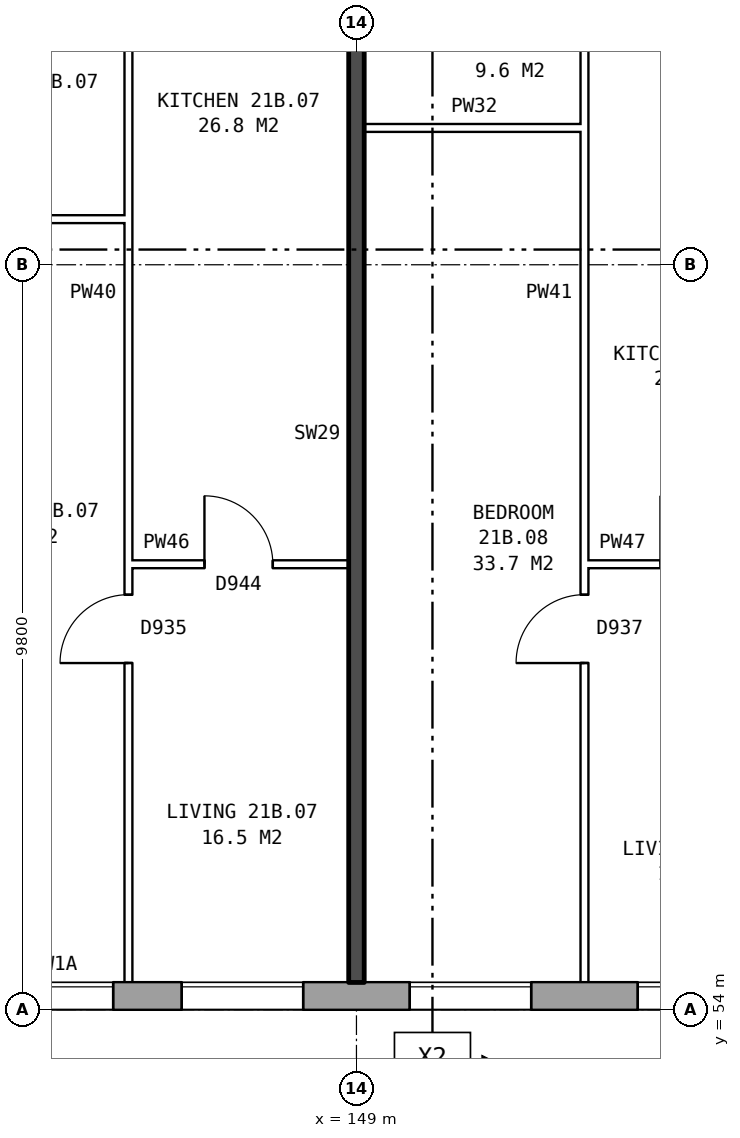
"""IFC4 building model, lengths in metres.
Left out: names, types, materials, properties, quantities, classifications, styles, units other than length and angle.
Written with IfcOpenShell. Run it as: python <this file> out.ifc"""

import sys

from ifc_helpers import new_model, si_unit, direction, frame, frame_2d, origin, place, context, subcontext, project, spatial, rectangle, extrude, element, fill, save


model = new_model("IFC4")
c1 = context("Model", 3, precision=1e-05, world=origin(), true_north=direction((0.0, 1.0)))
c2 = subcontext(c1, "Body", "Model", "MODEL_VIEW")
j1 = project(units=[si_unit("LENGTHUNIT", "METRE"), si_unit("PLANEANGLEUNIT", "RADIAN")], contexts=[c1])
p1 = place(None, origin())
s1 = spatial("IfcSite", under=j1, at=p1, CompositionType="ELEMENT")
p2 = place(p1, origin())
s2 = spatial("IfcBuilding", under=s1, at=p2, CompositionType="ELEMENT")
p3 = place(p2, frame((0.0, 0.0, 77.8)))
s3 = spatial("IfcBuildingStorey", under=s2, at=p3, CompositionType="ELEMENT", Elevation=77.8)
p4 = place(p3, frame((134.075, 54.18, 0.0), z_axis=(0.0, 0.0, 1.0), x_axis=(1.0, 0.0, 0.0)))
e1 = element("IfcWall", 1, at=p4, inside=s3, PredefinedType="STANDARD", context=c2, shape_type="SweptSolid", body=[
    extrude(rectangle(XDim=38.101, YDim=0.36, at=frame_2d((19.05, 0.0))), origin(), (0.0, 0.0, 1.0), 2.85),
])
p5 = place(p4, frame((0.625, 0.0, 0.8)))
e2 = element("IfcOpeningElement", 2, at=p5, cuts=e1, PredefinedType="OPENING", context=c2, shape_type="SweptSolid", body=[
    extrude(rectangle(XDim=1.6, YDim=1.8, at=frame_2d((0.8, 0.9))), frame((0.0, 0.19, 0.0), z_axis=(0.0, -1.0, 0.0), x_axis=(1.0, 0.0, 0.0)), (0.0, 0.0, 1.0), 0.38),
])
p6 = place(p4, frame((3.625, 0.0, 0.8)))
e3 = element("IfcOpeningElement", 3, at=p6, cuts=e1, PredefinedType="OPENING", context=c2, shape_type="SweptSolid", body=[
    extrude(rectangle(XDim=1.6, YDim=1.8, at=frame_2d((0.8, 0.9))), frame((0.0, 0.19, 0.0), z_axis=(0.0, -1.0, 0.0), x_axis=(1.0, 0.0, 0.0)), (0.0, 0.0, 1.0), 0.38),
])
p7 = place(p4, frame((5.525, 0.0, 0.8)))
e4 = element("IfcOpeningElement", 4, at=p7, cuts=e1, PredefinedType="OPENING", context=c2, shape_type="SweptSolid", body=[
    extrude(rectangle(XDim=1.6, YDim=1.8, at=frame_2d((0.8, 0.9))), frame((0.0, 0.19, 0.0), z_axis=(0.0, -1.0, 0.0), x_axis=(1.0, 0.0, 0.0)), (0.0, 0.0, 1.0), 0.38),
])
p8 = place(p4, frame((9.425, 0.0, 0.65)))
e5 = element("IfcOpeningElement", 5, at=p8, cuts=e1, PredefinedType="OPENING", context=c2, shape_type="SweptSolid", body=[
    extrude(rectangle(XDim=0.6, YDim=0.9, at=frame_2d((0.3, 0.45))), frame((0.0, 0.19, 0.0), z_axis=(0.0, -1.0, 0.0), x_axis=(1.0, 0.0, 0.0)), (0.0, 0.0, 1.0), 0.38),
])
p9 = place(p4, frame((12.625, 0.0, 0.8)))
e6 = element("IfcOpeningElement", 6, at=p9, cuts=e1, PredefinedType="OPENING", context=c2, shape_type="SweptSolid", body=[
    extrude(rectangle(XDim=1.6, YDim=1.8, at=frame_2d((0.8, 0.9))), frame((0.0, 0.19, 0.0), z_axis=(0.0, -1.0, 0.0), x_axis=(1.0, 0.0, 0.0)), (0.0, 0.0, 1.0), 0.38),
])
p10 = place(p4, frame((15.625, 0.0, 0.8)))
e7 = element("IfcOpeningElement", 7, at=p10, cuts=e1, PredefinedType="OPENING", context=c2, shape_type="SweptSolid", body=[
    extrude(rectangle(XDim=1.6, YDim=1.8, at=frame_2d((0.8, 0.9))), frame((0.0, 0.19, 0.0), z_axis=(0.0, -1.0, 0.0), x_axis=(1.0, 0.0, 0.0)), (0.0, 0.0, 1.0), 0.38),
])
p11 = place(p4, frame((18.625, 0.0, 0.8)))
e8 = element("IfcOpeningElement", 8, at=p11, cuts=e1, PredefinedType="OPENING", context=c2, shape_type="SweptSolid", body=[
    extrude(rectangle(XDim=1.6, YDim=1.8, at=frame_2d((0.8, 0.9))), frame((0.0, 0.19, 0.0), z_axis=(0.0, -1.0, 0.0), x_axis=(1.0, 0.0, 0.0)), (0.0, 0.0, 1.0), 0.38),
])
p12 = place(p4, frame((21.625, 0.0, 0.8)))
e9 = element("IfcOpeningElement", 9, at=p12, cuts=e1, PredefinedType="OPENING", context=c2, shape_type="SweptSolid", body=[
    extrude(rectangle(XDim=1.6, YDim=1.8, at=frame_2d((0.8, 0.9))), frame((0.0, 0.19, 0.0), z_axis=(0.0, -1.0, 0.0), x_axis=(1.0, 0.0, 0.0)), (0.0, 0.0, 1.0), 0.38),
])
p13 = place(p4, frame((24.625, 0.0, 0.8)))
e10 = element("IfcOpeningElement", 10, at=p13, cuts=e1, PredefinedType="OPENING", context=c2, shape_type="SweptSolid", body=[
    extrude(rectangle(XDim=1.6, YDim=1.8, at=frame_2d((0.8, 0.9))), frame((0.0, 0.19, 0.0), z_axis=(0.0, -1.0, 0.0), x_axis=(1.0, 0.0, 0.0)), (0.0, 0.0, 1.0), 0.38),
])
p14 = place(p4, frame((27.125, 0.0, 0.8)))
e11 = element("IfcOpeningElement", 11, at=p14, cuts=e1, PredefinedType="OPENING", context=c2, shape_type="SweptSolid", body=[
    extrude(rectangle(XDim=1.4, YDim=0.9, at=frame_2d((0.7, 0.45))), frame((0.0, 0.19, 0.0), z_axis=(0.0, -1.0, 0.0), x_axis=(1.0, 0.0, 0.0)), (0.0, 0.0, 1.0), 0.38),
])
p15 = place(p4, frame((30.625, 0.0, 0.8)))
e12 = element("IfcOpeningElement", 12, at=p15, cuts=e1, PredefinedType="OPENING", context=c2, shape_type="SweptSolid", body=[
    extrude(rectangle(XDim=1.6, YDim=1.8, at=frame_2d((0.8, 0.9))), frame((0.0, 0.19, 0.0), z_axis=(0.0, -1.0, 0.0), x_axis=(1.0, 0.0, 0.0)), (0.0, 0.0, 1.0), 0.38),
])
p16 = place(p4, frame((33.625, 0.0, 0.8)))
e13 = element("IfcOpeningElement", 13, at=p16, cuts=e1, PredefinedType="OPENING", context=c2, shape_type="SweptSolid", body=[
    extrude(rectangle(XDim=1.6, YDim=1.8, at=frame_2d((0.8, 0.9))), frame((0.0, 0.19, 0.0), z_axis=(0.0, -1.0, 0.0), x_axis=(1.0, 0.0, 0.0)), (0.0, 0.0, 1.0), 0.38),
])
p17 = place(p4, frame((7.425, 0.0, 1.3)))
e14 = element("IfcOpeningElement", 14, at=p17, cuts=e1, PredefinedType="OPENING", context=c2, shape_type="SweptSolid", body=[
    extrude(rectangle(XDim=0.6, YDim=1.2, at=frame_2d((0.3, 0.6))), frame((0.0, 0.19, 0.0), z_axis=(0.0, -1.0, 0.0), x_axis=(1.0, 0.0, 0.0)), (0.0, 0.0, 1.0), 0.38),
])
p18 = place(p4, frame((10.325, 0.0, 0.65)))
e15 = element("IfcOpeningElement", 15, at=p18, cuts=e1, PredefinedType="OPENING", context=c2, shape_type="SweptSolid", body=[
    extrude(rectangle(XDim=1.4, YDim=1.8, at=frame_2d((0.7, 0.9))), frame((0.0, 0.19, 0.0), z_axis=(0.0, -1.0, 0.0), x_axis=(1.0, 0.0, 0.0)), (0.0, 0.0, 1.0), 0.38),
])
p19 = place(p4, frame((29.675, 0.0, 1.7)))
e16 = element("IfcOpeningElement", 16, at=p19, cuts=e1, PredefinedType="OPENING", context=c2, shape_type="SweptSolid", body=[
    extrude(rectangle(XDim=0.6, YDim=0.9, at=frame_2d((0.3, 0.45))), frame((0.0, 0.19, 0.0), z_axis=(0.0, -1.0, 0.0), x_axis=(1.0, 0.0, 0.0)), (0.0, 0.0, 1.0), 0.38),
])
p20 = place(p3, frame((146.0, 59.86, 0.0), z_axis=(0.0, 0.0, 1.0), x_axis=(1.0, 0.0, 0.0)))
e17 = element("IfcWall", 17, at=p20, inside=s3, PredefinedType="PARTITIONING", context=c2, shape_type="SweptSolid", body=[
    extrude(rectangle(XDim=2.9, YDim=0.1, at=frame_2d((1.45, 0.0))), origin(), (0.0, 0.0, 1.0), 2.85),
])
p21 = place(p20, frame((1.0, 0.0, 0.0)))
e18 = element("IfcOpeningElement", 18, at=p21, cuts=e17, PredefinedType="OPENING", context=c2, shape_type="SweptSolid", body=[
    extrude(rectangle(XDim=0.9, YDim=2.1, at=frame_2d((0.45, 1.05))), frame((0.0, 0.06, 0.0), z_axis=(0.0, -1.0, 0.0), x_axis=(1.0, 0.0, 0.0)), (0.0, 0.0, 1.0), 0.12),
])
p22 = place(p3, frame((152.0, 59.86, 0.0), z_axis=(0.0, 0.0, 1.0), x_axis=(1.0, 0.0, 0.0)))
e19 = element("IfcWall", 19, at=p22, inside=s3, PredefinedType="PARTITIONING", context=c2, shape_type="SweptSolid", body=[
    extrude(rectangle(XDim=2.9, YDim=0.1, at=frame_2d((1.45, 0.0))), origin(), (0.0, 0.0, 1.0), 2.85),
])
p23 = place(p22, frame((1.0, 0.0, 0.0)))
e20 = element("IfcOpeningElement", 20, at=p23, cuts=e19, PredefinedType="OPENING", context=c2, shape_type="SweptSolid", body=[
    extrude(rectangle(XDim=0.9, YDim=2.1, at=frame_2d((0.45, 1.05))), frame((0.0, 0.06, 0.0), z_axis=(0.0, -1.0, 0.0), x_axis=(1.0, 0.0, 0.0)), (0.0, 0.0, 1.0), 0.12),
])
p24 = place(p3, frame((142.76, 64.4, 0.0), z_axis=(0.0, 0.0, 1.0), x_axis=(1.0, 0.0, 0.0)))
e21 = element("IfcWall", 21, at=p24, inside=s3, PredefinedType="PARTITIONING", context=c2, shape_type="SweptSolid", body=[
    extrude(rectangle(XDim=3.24, YDim=0.1, at=frame_2d((1.62, 0.0))), origin(), (0.0, 0.0, 1.0), 2.85),
])
p25 = place(p3, frame((149.1, 65.6, 0.0), z_axis=(0.0, 0.0, 1.0), x_axis=(1.0, 0.0, 0.0)))
e22 = element("IfcWall", 22, at=p25, inside=s3, PredefinedType="PARTITIONING", context=c2, shape_type="SweptSolid", body=[
    extrude(rectangle(XDim=2.9, YDim=0.1, at=frame_2d((1.45, 0.0))), origin(), (0.0, 0.0, 1.0), 2.85),
])
p26 = place(p3, frame((146.0, 54.36, 0.0), z_axis=(0.0, 0.0, 1.0), x_axis=(0.0, 1.0, 0.0)))
e23 = element("IfcWall", 23, at=p26, inside=s3, PredefinedType="PARTITIONING", context=c2, shape_type="SweptSolid", body=[
    extrude(rectangle(XDim=14.34, YDim=0.1, at=frame_2d((7.17, 0.0))), origin(), (0.0, 0.0, 1.0), 2.85),
])
p27 = place(p26, frame((4.2, 0.0, 0.0)))
e24 = element("IfcOpeningElement", 24, at=p27, cuts=e23, PredefinedType="OPENING", context=c2, shape_type="SweptSolid", body=[
    extrude(rectangle(XDim=0.9, YDim=2.1, at=frame_2d((0.45, 1.05))), frame((0.0, 0.06, 0.0), z_axis=(0.0, -1.0, 0.0), x_axis=(1.0, 0.0, 0.0)), (0.0, 0.0, 1.0), 0.12),
])
p28 = place(p26, frame((13.04, 0.0, 0.0)))
e25 = element("IfcOpeningElement", 25, at=p28, cuts=e23, PredefinedType="OPENING", context=c2, shape_type="SweptSolid", body=[
    extrude(rectangle(XDim=0.9, YDim=2.1, at=frame_2d((0.45, 1.05))), frame((0.0, 0.06, 0.0), z_axis=(0.0, -1.0, 0.0), x_axis=(1.0, 0.0, 0.0)), (0.0, 0.0, 1.0), 0.12),
])
p29 = place(p3, frame((149.0, 54.36, 0.0), z_axis=(0.0, 0.0, 1.0), x_axis=(0.0, 1.0, 0.0)))
e26 = element("IfcWall", 26, at=p29, inside=s3, PredefinedType="SOLIDWALL", context=c2, shape_type="SweptSolid", body=[
    extrude(rectangle(XDim=14.44, YDim=0.2, at=frame_2d((7.22, 0.0))), origin(), (0.0, 0.0, 1.0), 2.85),
])
p30 = place(p3, frame((152.0, 54.36, 0.0), z_axis=(0.0, 0.0, 1.0), x_axis=(0.0, 1.0, 0.0)))
e27 = element("IfcWall", 27, at=p30, inside=s3, PredefinedType="PARTITIONING", context=c2, shape_type="SweptSolid", body=[
    extrude(rectangle(XDim=14.34, YDim=0.1, at=frame_2d((7.17, 0.0))), origin(), (0.0, 0.0, 1.0), 2.85),
])
p31 = place(p30, frame((4.2, 0.0, 0.0)))
e28 = element("IfcOpeningElement", 28, at=p31, cuts=e27, PredefinedType="OPENING", context=c2, shape_type="SweptSolid", body=[
    extrude(rectangle(XDim=0.9, YDim=2.1, at=frame_2d((0.45, 1.05))), frame((0.0, 0.06, 0.0), z_axis=(0.0, -1.0, 0.0), x_axis=(1.0, 0.0, 0.0)), (0.0, 0.0, 1.0), 0.12),
])
p32 = place(p30, frame((13.04, 0.0, 0.0)))
e29 = element("IfcOpeningElement", 29, at=p32, cuts=e27, PredefinedType="OPENING", context=c2, shape_type="SweptSolid", body=[
    extrude(rectangle(XDim=0.9, YDim=2.1, at=frame_2d((0.45, 1.05))), frame((0.0, 0.06, 0.0), z_axis=(0.0, -1.0, 0.0), x_axis=(1.0, 0.0, 0.0)), (0.0, 0.0, 1.0), 0.12),
])
p33 = place(p9, origin())
e30 = element("IfcWindow", 30, at=p33, inside=s3, PartitioningType="SINGLE_PANEL", PredefinedType="WINDOW", context=c2, shape_type="SweptSolid", body=[
    extrude(rectangle(XDim=1.6, YDim=1.8, at=frame_2d((0.8, 0.9))), frame((0.0, 0.15, 0.0), z_axis=(0.0, -1.0, 0.0), x_axis=(1.0, 0.0, 0.0)), (0.0, 0.0, 1.0), 0.06),
])
fill(e6, e30)
p34 = place(p10, origin())
e31 = element("IfcWindow", 31, at=p34, inside=s3, PartitioningType="SINGLE_PANEL", PredefinedType="WINDOW", context=c2, shape_type="SweptSolid", body=[
    extrude(rectangle(XDim=1.6, YDim=1.8, at=frame_2d((0.8, 0.9))), frame((0.0, 0.15, 0.0), z_axis=(0.0, -1.0, 0.0), x_axis=(1.0, 0.0, 0.0)), (0.0, 0.0, 1.0), 0.06),
])
fill(e7, e31)
p35 = place(p11, origin())
e32 = element("IfcWindow", 32, at=p35, inside=s3, PartitioningType="SINGLE_PANEL", PredefinedType="WINDOW", context=c2, shape_type="SweptSolid", body=[
    extrude(rectangle(XDim=1.6, YDim=1.8, at=frame_2d((0.8, 0.9))), frame((0.0, 0.15, 0.0), z_axis=(0.0, -1.0, 0.0), x_axis=(1.0, 0.0, 0.0)), (0.0, 0.0, 1.0), 0.06),
])
fill(e8, e32)
p36 = place(p27, origin())
e33 = element("IfcDoor", 33, at=p36, inside=s3, OperationType="SINGLE_SWING_LEFT", PredefinedType="DOOR", context=c2, shape_type="SweptSolid", body=[
    extrude(rectangle(XDim=0.9, YDim=2.1, at=frame_2d((0.45, 1.05))), frame((0.0, 0.025, 0.0), z_axis=(0.0, -1.0, 0.0), x_axis=(1.0, 0.0, 0.0)), (0.0, 0.0, 1.0), 0.05),
])
fill(e24, e33)
p37 = place(p21, origin())
e34 = element("IfcDoor", 34, at=p37, inside=s3, OperationType="SINGLE_SWING_LEFT", PredefinedType="DOOR", context=c2, shape_type="SweptSolid", body=[
    extrude(rectangle(XDim=0.9, YDim=2.1, at=frame_2d((0.45, 1.05))), frame((0.0, 0.025, 0.0), z_axis=(0.0, -1.0, 0.0), x_axis=(1.0, 0.0, 0.0)), (0.0, 0.0, 1.0), 0.05),
])
fill(e18, e34)
p38 = place(p31, origin())
e35 = element("IfcDoor", 35, at=p38, inside=s3, OperationType="SINGLE_SWING_LEFT", PredefinedType="DOOR", context=c2, shape_type="SweptSolid", body=[
    extrude(rectangle(XDim=0.9, YDim=2.1, at=frame_2d((0.45, 1.05))), frame((0.0, 0.025, 0.0), z_axis=(0.0, -1.0, 0.0), x_axis=(1.0, 0.0, 0.0)), (0.0, 0.0, 1.0), 0.05),
])
fill(e28, e35)
p39 = place(p18, origin())
e36 = element("IfcWindow", 36, at=p39, inside=s3, PartitioningType="SINGLE_PANEL", PredefinedType="WINDOW", context=c2, shape_type="SweptSolid", body=[
    extrude(rectangle(XDim=1.4, YDim=1.8, at=frame_2d((0.7, 0.9))), frame((0.0, 0.15, 0.0), z_axis=(0.0, -1.0, 0.0), x_axis=(1.0, 0.0, 0.0)), (0.0, 0.0, 1.0), 0.06),
])
fill(e15, e36)
save(model, sys.argv[1])
